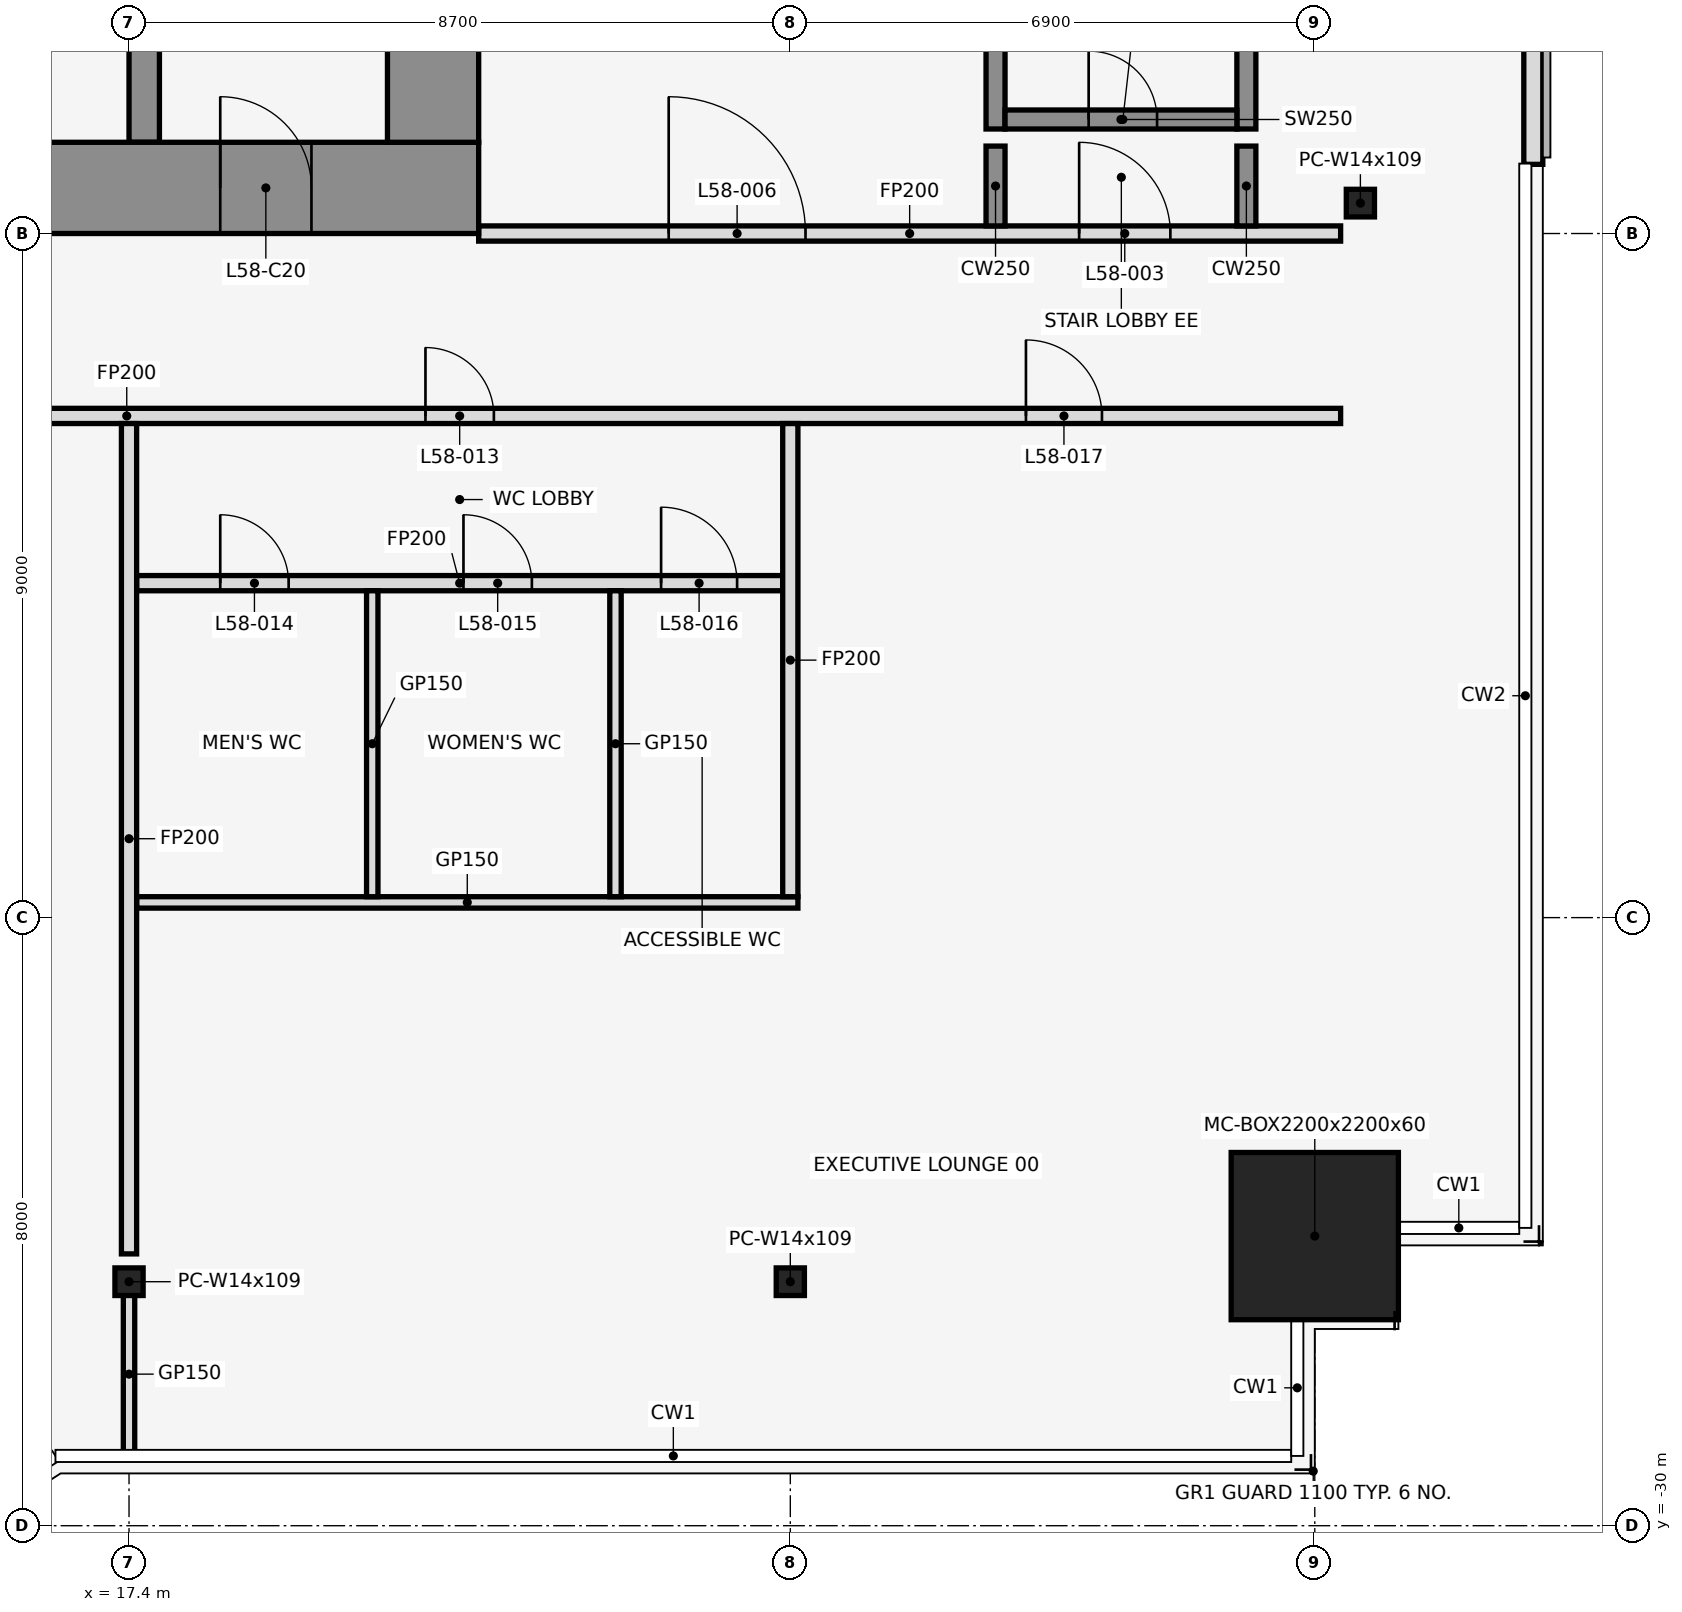
"""IFC4 building model, lengths in metres.
Left out: names, types, materials, properties, quantities, classifications, styles, units other than length and angle.
Written with IfcOpenShell. Run it as: python <this file> out.ifc"""

import sys

from ifc_helpers import new_model, si_unit, direction, frame, frame_2d, origin, origin_2d, place, context, subcontext, project, spatial, rectangle, hollow_rectangle, i_section, extrude, element, fill, save


model = new_model("IFC4")
c1 = context("Model", 3, precision=1e-05, world=origin(), true_north=direction((0.0, 1.0)))
c2 = subcontext(c1, "Body", "Model", "MODEL_VIEW")
j1 = project(units=[si_unit("LENGTHUNIT", "METRE"), si_unit("PLANEANGLEUNIT", "RADIAN")], contexts=[c1])
p1 = place(None, origin())
s1 = spatial("IfcSite", under=j1, at=p1, CompositionType="ELEMENT")
p2 = place(p1, origin())
s2 = spatial("IfcBuilding", under=s1, at=p2, CompositionType="ELEMENT")
p3 = place(p2, frame((0.0, 0.0, 258.2)))
s3 = spatial("IfcBuildingStorey", under=s2, at=p3, CompositionType="ELEMENT", Elevation=258.2)
for number, where, z_axis, x_axis in (
    (1, (17.4, -26.79, 0.0), (0.0, 0.0, 1.0), (1.0, 0.0, 0.0)),
    (2, (26.1, -26.79, 0.0), (0.0, 0.0, 1.0), (1.0, 0.0, 0.0)),
):
    element("IfcColumn", number, at=place(p3, frame(where, z_axis=z_axis, x_axis=x_axis)), inside=s3, PredefinedType="COLUMN", context=c2, shape_type="SweptSolid", body=[
        extrude(i_section(OverallWidth=0.371, OverallDepth=0.363, WebThickness=0.013, FlangeThickness=0.022, at=origin_2d()), origin(), (0.0, 0.0, 1.0), 4.2),
    ])
p4 = place(p3, frame((33.0, -26.19, 0.0), z_axis=(0.0, 0.0, 1.0), x_axis=(1.0, 0.0, 0.0)))
e3 = element("IfcColumn", 3, at=p4, inside=s3, PredefinedType="COLUMN", context=c2, shape_type="SweptSolid", body=[
    extrude(hollow_rectangle(XDim=2.2, YDim=2.2, WallThickness=0.06, at=origin_2d()), origin(), (0.0, 0.0, 1.0), 4.2),
])
p5 = place(p3, frame((33.6, -12.6, 0.0), z_axis=(0.0, 0.0, 1.0), x_axis=(1.0, 0.0, 0.0)))
e4 = element("IfcColumn", 4, at=p5, inside=s3, PredefinedType="COLUMN", context=c2, shape_type="SweptSolid", body=[
    extrude(i_section(OverallWidth=0.371, OverallDepth=0.363, WebThickness=0.013, FlangeThickness=0.022, at=origin_2d()), origin(), (0.0, 0.0, 1.0), 4.2),
])
p6 = place(p3, frame((35.875, -12.09, 0.0), z_axis=(0.0, 0.0, 1.0), x_axis=(0.0, 1.0, 0.0)))
e5 = element("IfcWall", 5, at=p6, inside=s3, PredefinedType="STANDARD", context=c2, shape_type="SweptSolid", body=[
    extrude(rectangle(XDim=9.09, YDim=0.25, at=frame_2d((4.545, 0.0))), origin(), (0.0, 0.0, 1.0), 4.05),
])
p7 = place(p3, frame((28.8, -11.625, 0.0), z_axis=(0.0, 0.0, 1.0), x_axis=(0.0, 1.0, 0.0)))
e6 = element("IfcWall", 6, at=p7, inside=s3, PredefinedType="SHEAR", context=c2, shape_type="SweptSolid", body=[
    extrude(rectangle(XDim=7.25, YDim=0.25, at=frame_2d((3.625, 0.0))), origin(), (0.0, 0.0, 1.0), 4.2),
])
p8 = place(p3, frame((32.1, -11.625, 0.0), z_axis=(0.0, 0.0, 1.0), x_axis=(0.0, 1.0, 0.0)))
e7 = element("IfcWall", 7, at=p8, inside=s3, PredefinedType="SHEAR", context=c2, shape_type="SweptSolid", body=[
    extrude(rectangle(XDim=7.525, YDim=0.25, at=frame_2d((3.762, 0.0))), origin(), (0.0, 0.0, 1.0), 4.2),
])
p9 = place(p3, frame((28.925, -11.5, 0.0), z_axis=(0.0, 0.0, 1.0), x_axis=(1.0, 0.0, 0.0)))
e8 = element("IfcWall", 8, at=p9, inside=s3, PredefinedType="SHEAR", context=c2, shape_type="SweptSolid", body=[
    extrude(rectangle(XDim=3.05, YDim=0.25, at=frame_2d((1.525, 0.0))), origin(), (0.0, 0.0, 1.0), 4.2),
])
p10 = place(p9, frame((1.1, 0.0, 0.0)))
e9 = element("IfcOpeningElement", 9, at=p10, cuts=e8, PredefinedType="OPENING", context=c2, shape_type="SweptSolid", body=[
    extrude(rectangle(XDim=0.9, YDim=2.1, at=frame_2d((0.45, 1.05))), frame((0.0, 0.137, 0.0), z_axis=(0.0, -1.0, 0.0), x_axis=(1.0, 0.0, 0.0)), (0.0, 0.0, 1.0), 0.274),
])
p11 = place(p3, frame((17.5, -21.8, 0.0), z_axis=(0.0, 0.0, 1.0), x_axis=(1.0, 0.0, 0.0)))
e10 = element("IfcWall", 10, at=p11, inside=s3, PredefinedType="PARTITIONING", context=c2, shape_type="SweptSolid", body=[
    extrude(rectangle(XDim=8.7, YDim=0.15, at=frame_2d((4.35, 0.0))), origin(), (0.0, 0.0, 1.0), 3.118),
])
p12 = place(p3, frame((17.5, -17.6, 0.0), z_axis=(0.0, 0.0, 1.0), x_axis=(1.0, 0.0, 0.0)))
e11 = element("IfcWall", 11, at=p12, inside=s3, PredefinedType="PARTITIONING", context=c2, shape_type="SweptSolid", body=[
    extrude(rectangle(XDim=8.5, YDim=0.2, at=frame_2d((4.25, 0.0))), origin(), (0.0, 0.0, 1.0), 3.118),
])
p13 = place(p12, frame((1.1, 0.0, 0.0)))
e12 = element("IfcOpeningElement", 12, at=p13, cuts=e11, PredefinedType="OPENING", context=c2, shape_type="SweptSolid", body=[
    extrude(rectangle(XDim=0.9, YDim=2.1, at=frame_2d((0.45, 1.05))), frame((0.0, 0.112, 0.0), z_axis=(0.0, -1.0, 0.0), x_axis=(1.0, 0.0, 0.0)), (0.0, 0.0, 1.0), 0.224),
])
p14 = place(p12, frame((4.3, 0.0, 0.0)))
e13 = element("IfcOpeningElement", 13, at=p14, cuts=e11, PredefinedType="OPENING", context=c2, shape_type="SweptSolid", body=[
    extrude(rectangle(XDim=0.9, YDim=2.1, at=frame_2d((0.45, 1.05))), frame((0.0, 0.112, 0.0), z_axis=(0.0, -1.0, 0.0), x_axis=(1.0, 0.0, 0.0)), (0.0, 0.0, 1.0), 0.224),
])
p15 = place(p12, frame((6.9, 0.0, 0.0)))
e14 = element("IfcOpeningElement", 14, at=p15, cuts=e11, PredefinedType="OPENING", context=c2, shape_type="SweptSolid", body=[
    extrude(rectangle(XDim=1.0, YDim=2.1, at=frame_2d((0.5, 1.05))), frame((0.0, 0.112, 0.0), z_axis=(0.0, -1.0, 0.0), x_axis=(1.0, 0.0, 0.0)), (0.0, 0.0, 1.0), 0.224),
])
p16 = place(p3, frame((1.4, -15.4, 0.0), z_axis=(0.0, 0.0, 1.0), x_axis=(1.0, 0.0, 0.0)))
e15 = element("IfcWall", 15, at=p16, inside=s3, PredefinedType="PARTITIONING", context=c2, shape_type="SweptSolid", body=[
    extrude(rectangle(XDim=31.94, YDim=0.2, at=frame_2d((15.97, 0.0))), origin(), (0.0, 0.0, 1.0), 3.118),
])
p17 = place(p16, frame((4.6, 0.0, 0.0)))
e16 = element("IfcOpeningElement", 16, at=p17, cuts=e15, PredefinedType="OPENING", context=c2, shape_type="SweptSolid", body=[
    extrude(rectangle(XDim=1.0, YDim=2.1, at=frame_2d((0.5, 1.05))), frame((0.0, 0.112, 0.0), z_axis=(0.0, -1.0, 0.0), x_axis=(1.0, 0.0, 0.0)), (0.0, 0.0, 1.0), 0.224),
])
p18 = place(p16, frame((12.6, 0.0, 0.0)))
e17 = element("IfcOpeningElement", 17, at=p18, cuts=e15, PredefinedType="OPENING", context=c2, shape_type="SweptSolid", body=[
    extrude(rectangle(XDim=1.0, YDim=2.1, at=frame_2d((0.5, 1.05))), frame((0.0, 0.112, 0.0), z_axis=(0.0, -1.0, 0.0), x_axis=(1.0, 0.0, 0.0)), (0.0, 0.0, 1.0), 0.224),
])
p19 = place(p16, frame((19.9, 0.0, 0.0)))
e18 = element("IfcOpeningElement", 18, at=p19, cuts=e15, PredefinedType="OPENING", context=c2, shape_type="SweptSolid", body=[
    extrude(rectangle(XDim=0.9, YDim=2.1, at=frame_2d((0.45, 1.05))), frame((0.0, 0.112, 0.0), z_axis=(0.0, -1.0, 0.0), x_axis=(1.0, 0.0, 0.0)), (0.0, 0.0, 1.0), 0.224),
])
p20 = place(p16, frame((27.8, 0.0, 0.0)))
e19 = element("IfcOpeningElement", 19, at=p20, cuts=e15, PredefinedType="OPENING", context=c2, shape_type="SweptSolid", body=[
    extrude(rectangle(XDim=1.0, YDim=2.1, at=frame_2d((0.5, 1.05))), frame((0.0, 0.112, 0.0), z_axis=(0.0, -1.0, 0.0), x_axis=(1.0, 0.0, 0.0)), (0.0, 0.0, 1.0), 0.224),
])
p21 = place(p3, frame((22.0, -13.0, 0.0), z_axis=(0.0, 0.0, 1.0), x_axis=(1.0, 0.0, 0.0)))
e20 = element("IfcWall", 20, at=p21, inside=s3, PredefinedType="PARTITIONING", context=c2, shape_type="SweptSolid", body=[
    extrude(rectangle(XDim=11.34, YDim=0.2, at=frame_2d((5.67, 0.0))), origin(), (0.0, 0.0, 1.0), 3.118),
])
p22 = place(p21, frame((7.9, 0.0, 0.0)))
e21 = element("IfcOpeningElement", 21, at=p22, cuts=e20, PredefinedType="OPENING", context=c2, shape_type="SweptSolid", body=[
    extrude(rectangle(XDim=1.2, YDim=2.1, at=frame_2d((0.6, 1.05))), frame((0.0, 0.112, 0.0), z_axis=(0.0, -1.0, 0.0), x_axis=(1.0, 0.0, 0.0)), (0.0, 0.0, 1.0), 0.224),
])
p23 = place(p21, frame((2.5, 0.0, 0.0)))
e22 = element("IfcOpeningElement", 22, at=p23, cuts=e20, PredefinedType="OPENING", context=c2, shape_type="SweptSolid", body=[
    extrude(rectangle(XDim=1.8, YDim=2.1, at=frame_2d((0.9, 1.05))), frame((0.0, 0.112, 0.0), z_axis=(0.0, -1.0, 0.0), x_axis=(1.0, 0.0, 0.0)), (0.0, 0.0, 1.0), 0.224),
])
p24 = place(p3, frame((17.4, -29.1, 0.0), z_axis=(0.0, 0.0, 1.0), x_axis=(0.0, 1.0, 0.0)))
e23 = element("IfcWall", 23, at=p24, inside=s3, PredefinedType="PARTITIONING", context=c2, shape_type="SweptSolid", body=[
    extrude(rectangle(XDim=2.188, YDim=0.15, at=frame_2d((1.094, 0.0))), origin(), (0.0, 0.0, 1.0), 3.118),
])
p25 = place(p3, frame((17.4, -26.424, 0.0), z_axis=(0.0, 0.0, 1.0), x_axis=(0.0, 1.0, 0.0)))
e24 = element("IfcWall", 24, at=p25, inside=s3, PredefinedType="PARTITIONING", context=c2, shape_type="SweptSolid", body=[
    extrude(rectangle(XDim=10.924, YDim=0.2, at=frame_2d((5.462, 0.0))), origin(), (0.0, 0.0, 1.0), 3.118),
])
for number, where, z_axis, x_axis in (
    (25, (20.6, -21.725, 0.0), (0.0, 0.0, 1.0), (0.0, 1.0, 0.0)),
    (26, (23.8, -21.725, 0.0), (0.0, 0.0, 1.0), (0.0, 1.0, 0.0)),
):
    element("IfcWall", number, at=place(p3, frame(where, z_axis=z_axis, x_axis=x_axis)), inside=s3, PredefinedType="PARTITIONING", context=c2, shape_type="SweptSolid", body=[
        extrude(rectangle(XDim=4.025, YDim=0.15, at=frame_2d((2.013, 0.0))), origin(), (0.0, 0.0, 1.0), 3.118),
    ])
p26 = place(p3, frame((26.1, -21.725, 0.0), z_axis=(0.0, 0.0, 1.0), x_axis=(0.0, 1.0, 0.0)))
e27 = element("IfcWall", 27, at=p26, inside=s3, PredefinedType="PARTITIONING", context=c2, shape_type="SweptSolid", body=[
    extrude(rectangle(XDim=6.225, YDim=0.2, at=frame_2d((3.113, 0.0))), origin(), (0.0, 0.0, 1.0), 3.118),
])
for number, where, z_axis, x_axis in (
    (28, (28.8, -12.9, 0.0), (0.0, 0.0, 1.0), (0.0, 1.0, 0.0)),
    (29, (32.1, -12.9, 0.0), (0.0, 0.0, 1.0), (0.0, 1.0, 0.0)),
):
    element("IfcWall", number, at=place(p3, frame(where, z_axis=z_axis, x_axis=x_axis)), inside=s3, PredefinedType="SHEAR", context=c2, shape_type="SweptSolid", body=[
        extrude(rectangle(XDim=1.05, YDim=0.25, at=frame_2d((0.525, 0.0))), origin(), (0.0, 0.0, 1.0), 4.2),
    ])
p27 = place(p3, frame((17.6, -11.8, 0.0), z_axis=(0.0, 0.0, 1.0), x_axis=(0.0, 1.0, 0.0)))
e30 = element("IfcWall", 30, at=p27, inside=s3, PredefinedType="SHEAR", context=c2, shape_type="SweptSolid", body=[
    extrude(rectangle(XDim=10.6, YDim=0.4, at=frame_2d((5.3, 0.0))), origin(), (0.0, 0.0, 1.0), 4.2),
])
p28 = place(p27, frame((1.25, 0.0, 0.0)))
e31 = element("IfcOpeningElement", 31, at=p28, cuts=e30, PredefinedType="OPENING", context=c2, shape_type="SweptSolid", body=[
    extrude(rectangle(XDim=1.1, YDim=2.1, at=frame_2d((0.55, 1.05))), frame((0.0, 0.212, 0.0), z_axis=(0.0, -1.0, 0.0), x_axis=(1.0, 0.0, 0.0)), (0.0, 0.0, 1.0), 0.424),
])
p29 = place(p27, frame((3.95, 0.0, 0.0)))
e32 = element("IfcOpeningElement", 32, at=p29, cuts=e30, PredefinedType="OPENING", context=c2, shape_type="SweptSolid", body=[
    extrude(rectangle(XDim=1.1, YDim=2.1, at=frame_2d((0.55, 1.05))), frame((0.0, 0.212, 0.0), z_axis=(0.0, -1.0, 0.0), x_axis=(1.0, 0.0, 0.0)), (0.0, 0.0, 1.0), 0.424),
])
p30 = place(p3, frame((-22.0, -12.4, 0.0), z_axis=(0.0, 0.0, 1.0), x_axis=(1.0, 0.0, 0.0)))
e33 = element("IfcWall", 33, at=p30, inside=s3, PredefinedType="SHEAR", context=c2, shape_type="SweptSolid", body=[
    extrude(rectangle(XDim=44.0, YDim=1.2, at=frame_2d((22.0, 0.0))), origin(), (0.0, 0.0, 1.0), 4.2),
])
p31 = place(p30, frame((2.2, 0.0, 0.0)))
e34 = element("IfcOpeningElement", 34, at=p31, cuts=e33, PredefinedType="OPENING", context=c2, shape_type="SweptSolid", body=[
    extrude(rectangle(XDim=1.2, YDim=2.1, at=frame_2d((0.6, 1.05))), frame((0.0, 0.612, 0.0), z_axis=(0.0, -1.0, 0.0), x_axis=(1.0, 0.0, 0.0)), (0.0, 0.0, 1.0), 1.224),
])
p32 = place(p30, frame((21.4, 0.0, 0.0)))
e35 = element("IfcOpeningElement", 35, at=p32, cuts=e33, PredefinedType="OPENING", context=c2, shape_type="SweptSolid", body=[
    extrude(rectangle(XDim=1.2, YDim=2.1, at=frame_2d((0.6, 1.05))), frame((0.0, 0.612, 0.0), z_axis=(0.0, -1.0, 0.0), x_axis=(1.0, 0.0, 0.0)), (0.0, 0.0, 1.0), 1.224),
])
p33 = place(p30, frame((40.6, 0.0, 0.0)))
e36 = element("IfcOpeningElement", 36, at=p33, cuts=e33, PredefinedType="OPENING", context=c2, shape_type="SweptSolid", body=[
    extrude(rectangle(XDim=1.2, YDim=2.1, at=frame_2d((0.6, 1.05))), frame((0.0, 0.612, 0.0), z_axis=(0.0, -1.0, 0.0), x_axis=(1.0, 0.0, 0.0)), (0.0, 0.0, 1.0), 1.224),
])
p34 = place(p30, frame((16.0, 0.0, 0.0)))
e37 = element("IfcOpeningElement", 37, at=p34, cuts=e33, PredefinedType="OPENING", context=c2, shape_type="SweptSolid", body=[
    extrude(rectangle(XDim=1.8, YDim=2.1, at=frame_2d((0.9, 1.05))), frame((0.0, 0.612, 0.0), z_axis=(0.0, -1.0, 0.0), x_axis=(1.0, 0.0, 0.0)), (0.0, 0.0, 1.0), 1.224),
])
p35 = place(p30, frame((6.3, 0.0, 0.0)))
e38 = element("IfcOpeningElement", 38, at=p35, cuts=e33, PredefinedType="OPENING", context=c2, shape_type="SweptSolid", body=[
    extrude(rectangle(XDim=1.2, YDim=2.1, at=frame_2d((0.6, 1.05))), frame((0.0, 0.612, 0.0), z_axis=(0.0, -1.0, 0.0), x_axis=(1.0, 0.0, 0.0)), (0.0, 0.0, 1.0), 1.224),
])
p36 = place(p30, frame((26.2, 0.0, 0.0)))
e39 = element("IfcOpeningElement", 39, at=p36, cuts=e33, PredefinedType="OPENING", context=c2, shape_type="SweptSolid", body=[
    extrude(rectangle(XDim=1.8, YDim=2.1, at=frame_2d((0.9, 1.05))), frame((0.0, 0.612, 0.0), z_axis=(0.0, -1.0, 0.0), x_axis=(1.0, 0.0, 0.0)), (0.0, 0.0, 1.0), 1.224),
])
p37 = place(p30, frame((36.5, 0.0, 0.0)))
e40 = element("IfcOpeningElement", 40, at=p37, cuts=e33, PredefinedType="OPENING", context=c2, shape_type="SweptSolid", body=[
    extrude(rectangle(XDim=1.2, YDim=2.1, at=frame_2d((0.6, 1.05))), frame((0.0, 0.612, 0.0), z_axis=(0.0, -1.0, 0.0), x_axis=(1.0, 0.0, 0.0)), (0.0, 0.0, 1.0), 1.224),
])
p38 = place(p3, frame((21.4, -11.8, 0.0), z_axis=(0.0, 0.0, 1.0), x_axis=(0.0, 1.0, 0.0)))
e41 = element("IfcWall", 41, at=p38, inside=s3, PredefinedType="SHEAR", context=c2, shape_type="SweptSolid", body=[
    extrude(rectangle(XDim=10.6, YDim=1.2, at=frame_2d((5.3, 0.0))), origin(), (0.0, 0.0, 1.0), 4.2),
])
p39 = place(p22, origin())
e42 = element("IfcDoor", 42, at=p39, inside=s3, OperationType="SINGLE_SWING_RIGHT", PredefinedType="DOOR", context=c2, shape_type="SweptSolid", body=[
    extrude(rectangle(XDim=1.2, YDim=2.1, at=frame_2d((0.6, 1.05))), frame((0.0, 0.025, 0.0), z_axis=(0.0, -1.0, 0.0), x_axis=(1.0, 0.0, 0.0)), (0.0, 0.0, 1.0), 0.05),
])
fill(e21, e42)
p40 = place(p10, origin())
e43 = element("IfcDoor", 43, at=p40, inside=s3, OperationType="SINGLE_SWING_LEFT", PredefinedType="DOOR", context=c2, shape_type="SweptSolid", body=[
    extrude(rectangle(XDim=0.9, YDim=2.1, at=frame_2d((0.45, 1.05))), frame((0.0, 0.025, 0.0), z_axis=(0.0, -1.0, 0.0), x_axis=(1.0, 0.0, 0.0)), (0.0, 0.0, 1.0), 0.05),
])
fill(e9, e43)
p41 = place(p23, origin())
e44 = element("IfcDoor", 44, at=p41, inside=s3, OperationType="SINGLE_SWING_LEFT", PredefinedType="DOOR", context=c2, shape_type="SweptSolid", body=[
    extrude(rectangle(XDim=1.8, YDim=2.1, at=frame_2d((0.9, 1.05))), frame((0.0, 0.025, 0.0), z_axis=(0.0, -1.0, 0.0), x_axis=(1.0, 0.0, 0.0)), (0.0, 0.0, 1.0), 0.05),
])
fill(e22, e44)
p42 = place(p19, frame((0.9, 0.0, 0.0), z_axis=(0.0, 0.0, 1.0), x_axis=(-1.0, 0.0, 0.0)))
e45 = element("IfcDoor", 45, at=p42, inside=s3, OperationType="SINGLE_SWING_LEFT", PredefinedType="DOOR", context=c2, shape_type="SweptSolid", body=[
    extrude(rectangle(XDim=0.9, YDim=2.1, at=frame_2d((0.45, 1.05))), frame((0.0, 0.025, 0.0), z_axis=(0.0, -1.0, 0.0), x_axis=(1.0, 0.0, 0.0)), (0.0, 0.0, 1.0), 0.05),
])
fill(e18, e45)
p43 = place(p13, frame((0.9, 0.0, 0.0), z_axis=(0.0, 0.0, 1.0), x_axis=(-1.0, 0.0, 0.0)))
e46 = element("IfcDoor", 46, at=p43, inside=s3, OperationType="SINGLE_SWING_RIGHT", PredefinedType="DOOR", context=c2, shape_type="SweptSolid", body=[
    extrude(rectangle(XDim=0.9, YDim=2.1, at=frame_2d((0.45, 1.05))), frame((0.0, 0.025, 0.0), z_axis=(0.0, -1.0, 0.0), x_axis=(1.0, 0.0, 0.0)), (0.0, 0.0, 1.0), 0.05),
])
fill(e12, e46)
p44 = place(p14, frame((0.9, 0.0, 0.0), z_axis=(0.0, 0.0, 1.0), x_axis=(-1.0, 0.0, 0.0)))
e47 = element("IfcDoor", 47, at=p44, inside=s3, OperationType="SINGLE_SWING_RIGHT", PredefinedType="DOOR", context=c2, shape_type="SweptSolid", body=[
    extrude(rectangle(XDim=0.9, YDim=2.1, at=frame_2d((0.45, 1.05))), frame((0.0, 0.025, 0.0), z_axis=(0.0, -1.0, 0.0), x_axis=(1.0, 0.0, 0.0)), (0.0, 0.0, 1.0), 0.05),
])
fill(e13, e47)
p45 = place(p15, frame((1.0, 0.0, 0.0), z_axis=(0.0, 0.0, 1.0), x_axis=(-1.0, 0.0, 0.0)))
e48 = element("IfcDoor", 48, at=p45, inside=s3, OperationType="SINGLE_SWING_LEFT", PredefinedType="DOOR", context=c2, shape_type="SweptSolid", body=[
    extrude(rectangle(XDim=1.0, YDim=2.1, at=frame_2d((0.5, 1.05))), frame((0.0, 0.025, 0.0), z_axis=(0.0, -1.0, 0.0), x_axis=(1.0, 0.0, 0.0)), (0.0, 0.0, 1.0), 0.05),
])
fill(e14, e48)
p46 = place(p20, frame((1.0, 0.0, 0.0), z_axis=(0.0, 0.0, 1.0), x_axis=(-1.0, 0.0, 0.0)))
e49 = element("IfcDoor", 49, at=p46, inside=s3, OperationType="SINGLE_SWING_RIGHT", PredefinedType="DOOR", context=c2, shape_type="SweptSolid", body=[
    extrude(rectangle(XDim=1.0, YDim=2.1, at=frame_2d((0.5, 1.05))), frame((0.0, 0.025, 0.0), z_axis=(0.0, -1.0, 0.0), x_axis=(1.0, 0.0, 0.0)), (0.0, 0.0, 1.0), 0.05),
])
fill(e19, e49)
p47 = place(p33, frame((1.2, 0.0, 0.0), z_axis=(0.0, 0.0, 1.0), x_axis=(-1.0, 0.0, 0.0)))
e50 = element("IfcDoor", 50, at=p47, inside=s3, OperationType="SINGLE_SWING_RIGHT", PredefinedType="DOOR", context=c2, shape_type="SweptSolid", body=[
    extrude(rectangle(XDim=1.2, YDim=2.1, at=frame_2d((0.6, 1.05))), frame((0.0, 0.025, 0.0), z_axis=(0.0, -1.0, 0.0), x_axis=(1.0, 0.0, 0.0)), (0.0, 0.0, 1.0), 0.05),
])
fill(e36, e50)
save(model, sys.argv[1])
